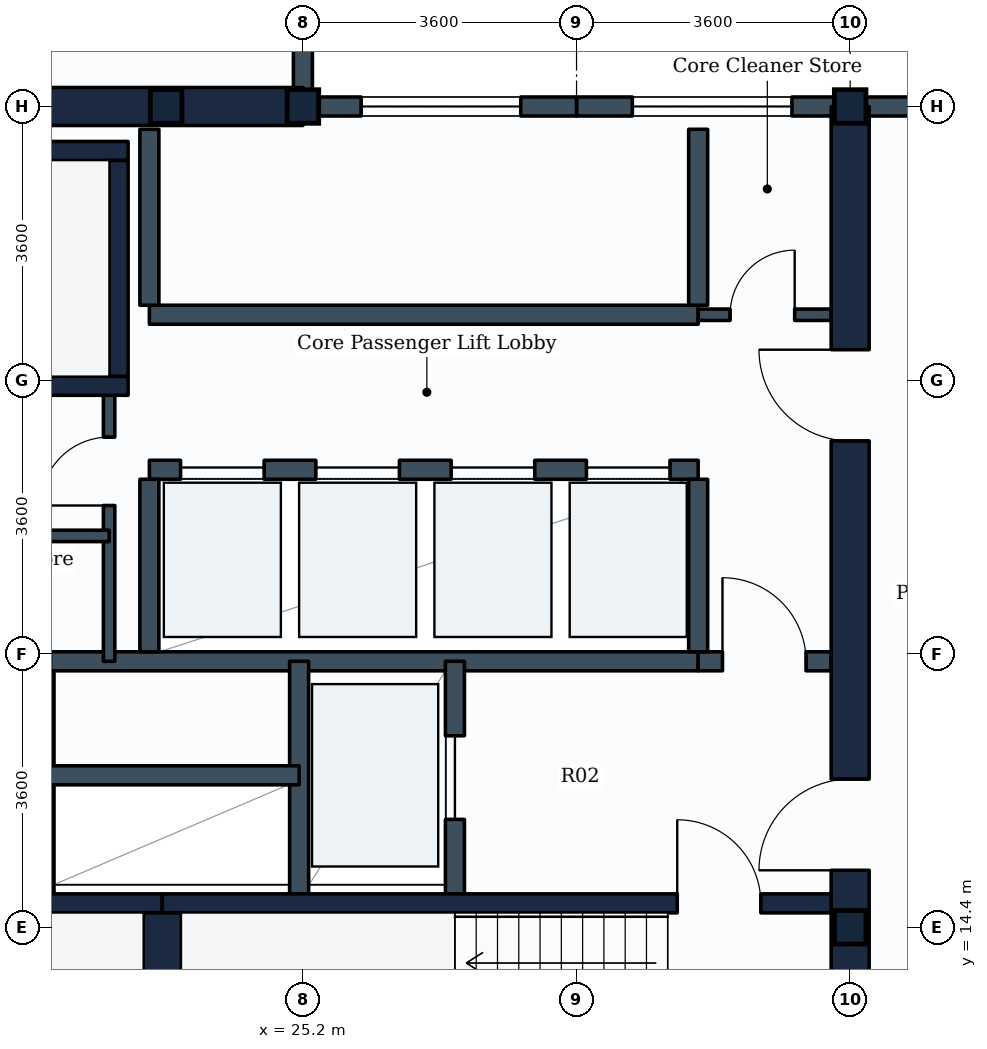
"""IFC4 building model, lengths in metres.
Left out: names, types, materials, properties, quantities, classifications, styles, units other than length and angle.
Written with IfcOpenShell. Run it as: python <this file> out.ifc"""

import sys

from ifc_helpers import new_model, si_unit, direction, frame, frame_2d, origin, origin_2d, place, context, subcontext, project, spatial, rectangle, i_section, extrude, element, fill, save


model = new_model("IFC4")
c1 = context("Model", 3, precision=1e-05, world=origin(), true_north=direction((0.0, 1.0)))
c2 = subcontext(c1, "Body", "Model", "MODEL_VIEW")
j1 = project(units=[si_unit("LENGTHUNIT", "METRE"), si_unit("PLANEANGLEUNIT", "RADIAN")], contexts=[c1])
p1 = place(None, origin())
s1 = spatial("IfcSite", under=j1, at=p1, CompositionType="ELEMENT")
p2 = place(p1, origin())
s2 = spatial("IfcBuilding", under=s1, at=p2, CompositionType="ELEMENT")
p3 = place(p2, frame((0.0, 0.0, 186.2)))
s3 = spatial("IfcBuildingStorey", under=s2, at=p3, CompositionType="ELEMENT", Elevation=186.2)
for number, where, z_axis, x_axis in (
    (1, (23.4, 25.2, 0.0), (0.0, 0.0, 1.0), (1.0, 0.0, 0.0)),
    (2, (25.2, 25.2, 0.0), (0.0, 0.0, 1.0), (1.0, 0.0, 0.0)),
    (3, (32.4, 14.4, 0.0), (0.0, 0.0, 1.0), (1.0, 0.0, 0.0)),
    (4, (32.4, 25.2, 0.0), (0.0, 0.0, 1.0), (1.0, 0.0, 0.0)),
):
    element("IfcColumn", number, at=place(p3, frame(where, z_axis=z_axis, x_axis=x_axis)), inside=s3, PredefinedType="COLUMN", context=c2, shape_type="SweptSolid", body=[
        extrude(i_section(OverallWidth=0.416, OverallDepth=0.442, WebThickness=0.025, FlangeThickness=0.041, FilletRadius=0.015, at=origin_2d()), origin(), (0.0, 0.0, 1.0), 3.8),
    ])
p4 = place(p3, frame((32.4, 25.2, 0.0), z_axis=(0.0, 0.0, 1.0), x_axis=(1.0, 0.0, 0.0)))
e5 = element("IfcWall", 5, at=p4, inside=s3, PredefinedType="STANDARD", context=c2, shape_type="SweptSolid", body=[
    extrude(rectangle(XDim=3.6, YDim=0.25, at=frame_2d((1.8, 0.0))), origin(), (0.0, 0.0, 1.0), 2.93),
])
p5 = place(p3, frame((28.8, 25.2, 0.0), z_axis=(0.0, 0.0, 1.0), x_axis=(1.0, 0.0, 0.0)))
e6 = element("IfcWall", 6, at=p5, inside=s3, PredefinedType="STANDARD", context=c2, shape_type="SweptSolid", body=[
    extrude(rectangle(XDim=3.6, YDim=0.25, at=frame_2d((1.8, 0.0))), origin(), (0.0, 0.0, 1.0), 2.93),
])
p6 = place(p5, frame((0.734, 0.0, 0.85)))
e7 = element("IfcOpeningElement", 7, at=p6, cuts=e6, PredefinedType="OPENING", context=c2, shape_type="SweptSolid", body=[
    extrude(rectangle(XDim=2.1, YDim=1.35, at=frame_2d((1.05, 0.675))), frame((0.0, 0.135, 0.0), z_axis=(0.0, -1.0, 0.0), x_axis=(1.0, 0.0, 0.0)), (0.0, 0.0, 1.0), 0.27),
])
p7 = place(p3, frame((25.2, 25.2, 0.0), z_axis=(0.0, 0.0, 1.0), x_axis=(1.0, 0.0, 0.0)))
e8 = element("IfcWall", 8, at=p7, inside=s3, PredefinedType="STANDARD", context=c2, shape_type="SweptSolid", body=[
    extrude(rectangle(XDim=3.6, YDim=0.25, at=frame_2d((1.8, 0.0))), origin(), (0.0, 0.0, 1.0), 2.93),
])
p8 = place(p7, frame((0.766, 0.0, 0.85)))
e9 = element("IfcOpeningElement", 9, at=p8, cuts=e8, PredefinedType="OPENING", context=c2, shape_type="SweptSolid", body=[
    extrude(rectangle(XDim=2.1, YDim=1.35, at=frame_2d((1.05, 0.675))), frame((0.0, 0.135, 0.0), z_axis=(0.0, -1.0, 0.0), x_axis=(1.0, 0.0, 0.0)), (0.0, 0.0, 1.0), 0.27),
])
p9 = place(p3, frame((25.2, 25.2, 0.0), z_axis=(0.0, 0.0, 1.0), x_axis=(0.0, 1.0, 0.0)))
e10 = element("IfcWall", 10, at=p9, inside=s3, PredefinedType="STANDARD", context=c2, shape_type="SweptSolid", body=[
    extrude(rectangle(XDim=3.6, YDim=0.25, at=frame_2d((1.8, 0.0))), origin(), (0.0, 0.0, 1.0), 2.93),
])
p10 = place(p3, frame((14.4, 25.2, 0.0), z_axis=(0.0, 0.0, 1.0), x_axis=(1.0, 0.0, 0.0)))
e11 = element("IfcWall", 11, at=p10, inside=s3, PredefinedType="SHEAR", context=c2, shape_type="SweptSolid", body=[
    extrude(rectangle(XDim=10.8, YDim=0.5, at=frame_2d((5.4, 0.0))), origin(), (0.0, 0.0, 1.0), 3.55),
])
p11 = place(p3, frame((32.4, 10.8, 0.0), z_axis=(0.0, 0.0, 1.0), x_axis=(0.0, 1.0, 0.0)))
e12 = element("IfcWall", 12, at=p11, inside=s3, PredefinedType="SHEAR", context=c2, shape_type="SweptSolid", body=[
    extrude(rectangle(XDim=14.4, YDim=0.5, at=frame_2d((7.2, 0.0))), origin(), (0.0, 0.0, 1.0), 3.55),
])
p12 = place(p11, frame((4.35, 0.0, 0.0)))
e13 = element("IfcOpeningElement", 13, at=p12, cuts=e12, PredefinedType="OPENING", context=c2, shape_type="SweptSolid", body=[
    extrude(rectangle(XDim=1.2, YDim=2.1, at=frame_2d((0.6, 1.05))), frame((0.0, 0.26, 0.0), z_axis=(0.0, -1.0, 0.0), x_axis=(1.0, 0.0, 0.0)), (0.0, 0.0, 1.0), 0.52),
])
p13 = place(p11, frame((10.0, 0.0, 0.0)))
e14 = element("IfcOpeningElement", 14, at=p13, cuts=e12, PredefinedType="OPENING", context=c2, shape_type="SweptSolid", body=[
    extrude(rectangle(XDim=1.2, YDim=2.1, at=frame_2d((0.6, 1.05))), frame((0.0, 0.26, 0.0), z_axis=(0.0, -1.0, 0.0), x_axis=(1.0, 0.0, 0.0)), (0.0, 0.0, 1.0), 0.52),
])
p14 = place(p3, frame((14.65, 14.715, 0.0), z_axis=(0.0, 0.0, 1.0), x_axis=(1.0, 0.0, 0.0)))
e15 = element("IfcWall", 15, at=p14, inside=s3, PredefinedType="SHEAR", context=c2, shape_type="SweptSolid", body=[
    extrude(rectangle(XDim=8.7, YDim=0.25, at=frame_2d((4.35, 0.0))), origin(), (0.0, 0.0, 1.0), 3.55),
])
p15 = place(p14, frame((0.705, 0.0, 0.0)))
e16 = element("IfcOpeningElement", 16, at=p15, cuts=e15, PredefinedType="OPENING", context=c2, shape_type="SweptSolid", body=[
    extrude(rectangle(XDim=1.1, YDim=2.1, at=frame_2d((0.55, 1.05))), frame((0.0, 0.135, 0.0), z_axis=(0.0, -1.0, 0.0), x_axis=(1.0, 0.0, 0.0)), (0.0, 0.0, 1.0), 0.27),
])
p16 = place(p3, frame((23.35, 14.715, 0.0), z_axis=(0.0, 0.0, 1.0), x_axis=(1.0, 0.0, 0.0)))
e17 = element("IfcWall", 17, at=p16, inside=s3, PredefinedType="SHEAR", context=c2, shape_type="SweptSolid", body=[
    extrude(rectangle(XDim=8.8, YDim=0.25, at=frame_2d((4.4, 0.0))), origin(), (0.0, 0.0, 1.0), 3.55),
])
p17 = place(p16, frame((6.775, 0.0, 0.0)))
e18 = element("IfcOpeningElement", 18, at=p17, cuts=e17, PredefinedType="OPENING", context=c2, shape_type="SweptSolid", body=[
    extrude(rectangle(XDim=1.1, YDim=2.1, at=frame_2d((0.55, 1.05))), frame((0.0, 0.135, 0.0), z_axis=(0.0, -1.0, 0.0), x_axis=(1.0, 0.0, 0.0)), (0.0, 0.0, 1.0), 0.27),
])
p18 = place(p3, frame((23.35, 11.75, 0.0), z_axis=(0.0, 0.0, 1.0), x_axis=(0.0, 1.0, 0.0)))
e19 = element("IfcWall", 19, at=p18, inside=s3, PredefinedType="SHEAR", context=c2, shape_type="SweptSolid", body=[
    extrude(rectangle(XDim=2.84, YDim=0.5, at=frame_2d((1.42, 0.0))), origin(), (0.0, 0.0, 1.0), 3.55),
])
for number, where, z_axis, x_axis in (
    (20, (14.65, 21.525, 0.0), (0.0, 0.0, 1.0), (1.0, 0.0, 0.0)),
    (21, (14.65, 24.615, 0.0), (0.0, 0.0, 1.0), (1.0, 0.0, 0.0)),
):
    element("IfcWall", number, at=place(p3, frame(where, z_axis=z_axis, x_axis=x_axis)), inside=s3, PredefinedType="SHEAR", context=c2, shape_type="SweptSolid", body=[
        extrude(rectangle(XDim=8.25, YDim=0.25, at=frame_2d((4.125, 0.0))), origin(), (0.0, 0.0, 1.0), 3.55),
    ])
p19 = place(p3, frame((22.775, 21.65, 0.0), z_axis=(0.0, 0.0, 1.0), x_axis=(0.0, 1.0, 0.0)))
e22 = element("IfcWall", 22, at=p19, inside=s3, PredefinedType="SHEAR", context=c2, shape_type="SweptSolid", body=[
    extrude(rectangle(XDim=2.84, YDim=0.25, at=frame_2d((1.42, 0.0))), origin(), (0.0, 0.0, 1.0), 3.55),
])
p20 = place(p3, frame((21.8, 14.84, 0.0), z_axis=(0.0, 0.0, 1.0), x_axis=(0.0, 1.0, 0.0)))
e23 = element("IfcWall", 23, at=p20, inside=s3, PredefinedType="PARTITIONING", context=c2, shape_type="SweptSolid", body=[
    extrude(rectangle(XDim=3.06, YDim=0.25, at=frame_2d((1.53, 0.0))), origin(), (0.0, 0.0, 1.0), 3.535),
])
p21 = place(p3, frame((21.88, 17.9, 0.0), z_axis=(0.0, 0.0, 1.0), x_axis=(1.0, 0.0, 0.0)))
e24 = element("IfcWall", 24, at=p21, inside=s3, PredefinedType="PARTITIONING", context=c2, shape_type="SweptSolid", body=[
    extrude(rectangle(XDim=8.52, YDim=0.25, at=frame_2d((4.26, 0.0))), origin(), (0.0, 0.0, 1.0), 3.535),
])
p22 = place(p3, frame((30.4, 17.9, 0.0), z_axis=(0.0, 0.0, 1.0), x_axis=(1.0, 0.0, 0.0)))
e25 = element("IfcWall", 25, at=p22, inside=s3, PredefinedType="PARTITIONING", context=c2, shape_type="SweptSolid", body=[
    extrude(rectangle(XDim=1.75, YDim=0.25, at=frame_2d((0.875, 0.0))), origin(), (0.0, 0.0, 1.0), 3.535),
])
p23 = place(p22, frame((0.32, 0.0, 0.0)))
e26 = element("IfcOpeningElement", 26, at=p23, cuts=e25, PredefinedType="OPENING", context=c2, shape_type="SweptSolid", body=[
    extrude(rectangle(XDim=1.1, YDim=2.1, at=frame_2d((0.55, 1.05))), frame((0.0, 0.135, 0.0), z_axis=(0.0, -1.0, 0.0), x_axis=(1.0, 0.0, 0.0)), (0.0, 0.0, 1.0), 0.27),
])
p24 = place(p3, frame((25.15, 14.84, 0.0), z_axis=(0.0, 0.0, 1.0), x_axis=(0.0, 1.0, 0.0)))
e27 = element("IfcWall", 27, at=p24, inside=s3, PredefinedType="PARTITIONING", context=c2, shape_type="SweptSolid", body=[
    extrude(rectangle(XDim=3.06, YDim=0.25, at=frame_2d((1.53, 0.0))), origin(), (0.0, 0.0, 1.0), 3.535),
])
p25 = place(p3, frame((27.2, 14.84, 0.0), z_axis=(0.0, 0.0, 1.0), x_axis=(0.0, 1.0, 0.0)))
e28 = element("IfcWall", 28, at=p25, inside=s3, PredefinedType="PARTITIONING", context=c2, shape_type="SweptSolid", body=[
    extrude(rectangle(XDim=3.06, YDim=0.25, at=frame_2d((1.53, 0.0))), origin(), (0.0, 0.0, 1.0), 3.535),
])
p26 = place(p25, frame((0.98, 0.0, 0.0)))
e29 = element("IfcOpeningElement", 29, at=p26, cuts=e28, PredefinedType="OPENING", context=c2, shape_type="SweptSolid", body=[
    extrude(rectangle(XDim=1.1, YDim=2.1, at=frame_2d((0.55, 1.05))), frame((0.0, 0.135, 0.0), z_axis=(0.0, -1.0, 0.0), x_axis=(1.0, 0.0, 0.0)), (0.0, 0.0, 1.0), 0.27),
])
p27 = place(p3, frame((21.8, 16.4, 0.0), z_axis=(0.0, 0.0, 1.0), x_axis=(1.0, 0.0, 0.0)))
e30 = element("IfcWall", 30, at=p27, inside=s3, PredefinedType="PARTITIONING", context=c2, shape_type="SweptSolid", body=[
    extrude(rectangle(XDim=3.35, YDim=0.25, at=frame_2d((1.675, 0.0))), origin(), (0.0, 0.0, 1.0), 3.535),
])
p28 = place(p3, frame((23.18, 20.42, 0.0), z_axis=(0.0, 0.0, 1.0), x_axis=(1.0, 0.0, 0.0)))
e31 = element("IfcWall", 31, at=p28, inside=s3, PredefinedType="PARTITIONING", context=c2, shape_type="SweptSolid", body=[
    extrude(rectangle(XDim=7.22, YDim=0.25, at=frame_2d((3.61, 0.0))), origin(), (0.0, 0.0, 1.0), 3.535),
])
p29 = place(p28, frame((0.41, 0.0, 0.0)))
e32 = element("IfcOpeningElement", 32, at=p29, cuts=e31, PredefinedType="OPENING", context=c2, shape_type="SweptSolid", body=[
    extrude(rectangle(XDim=1.1, YDim=2.1, at=frame_2d((0.55, 1.05))), frame((0.0, 0.135, 0.0), z_axis=(0.0, -1.0, 0.0), x_axis=(1.0, 0.0, 0.0)), (0.0, 0.0, 1.0), 0.27),
])
p30 = place(p28, frame((2.19, 0.0, 0.0)))
e33 = element("IfcOpeningElement", 33, at=p30, cuts=e31, PredefinedType="OPENING", context=c2, shape_type="SweptSolid", body=[
    extrude(rectangle(XDim=1.1, YDim=2.1, at=frame_2d((0.55, 1.05))), frame((0.0, 0.135, 0.0), z_axis=(0.0, -1.0, 0.0), x_axis=(1.0, 0.0, 0.0)), (0.0, 0.0, 1.0), 0.27),
])
p31 = place(p28, frame((3.97, 0.0, 0.0)))
e34 = element("IfcOpeningElement", 34, at=p31, cuts=e31, PredefinedType="OPENING", context=c2, shape_type="SweptSolid", body=[
    extrude(rectangle(XDim=1.1, YDim=2.1, at=frame_2d((0.55, 1.05))), frame((0.0, 0.135, 0.0), z_axis=(0.0, -1.0, 0.0), x_axis=(1.0, 0.0, 0.0)), (0.0, 0.0, 1.0), 0.27),
])
p32 = place(p28, frame((5.75, 0.0, 0.0)))
e35 = element("IfcOpeningElement", 35, at=p32, cuts=e31, PredefinedType="OPENING", context=c2, shape_type="SweptSolid", body=[
    extrude(rectangle(XDim=1.1, YDim=2.1, at=frame_2d((0.55, 1.05))), frame((0.0, 0.135, 0.0), z_axis=(0.0, -1.0, 0.0), x_axis=(1.0, 0.0, 0.0)), (0.0, 0.0, 1.0), 0.27),
])
for number, where, z_axis, x_axis in (
    (36, (23.18, 18.025, 0.0), (0.0, 0.0, 1.0), (0.0, 1.0, 0.0)),
    (37, (30.4, 18.025, 0.0), (0.0, 0.0, 1.0), (0.0, 1.0, 0.0)),
):
    element("IfcWall", number, at=place(p3, frame(where, z_axis=z_axis, x_axis=x_axis)), inside=s3, PredefinedType="PARTITIONING", context=c2, shape_type="SweptSolid", body=[
        extrude(rectangle(XDim=2.27, YDim=0.25, at=frame_2d((1.135, 0.0))), origin(), (0.0, 0.0, 1.0), 3.535),
    ])
p33 = place(p3, frame((23.18, 22.46, 0.0), z_axis=(0.0, 0.0, 1.0), x_axis=(1.0, 0.0, 0.0)))
e38 = element("IfcWall", 38, at=p33, inside=s3, PredefinedType="PARTITIONING", context=c2, shape_type="SweptSolid", body=[
    extrude(rectangle(XDim=7.22, YDim=0.25, at=frame_2d((3.61, 0.0))), origin(), (0.0, 0.0, 1.0), 3.535),
])
for number, where, z_axis, x_axis in (
    (39, (23.18, 22.585, 0.0), (0.0, 0.0, 1.0), (0.0, 1.0, 0.0)),
    (40, (30.4, 22.585, 0.0), (0.0, 0.0, 1.0), (0.0, 1.0, 0.0)),
):
    element("IfcWall", number, at=place(p3, frame(where, z_axis=z_axis, x_axis=x_axis)), inside=s3, PredefinedType="PARTITIONING", context=c2, shape_type="SweptSolid", body=[
        extrude(rectangle(XDim=2.315, YDim=0.25, at=frame_2d((1.157, 0.0))), origin(), (0.0, 0.0, 1.0), 3.535),
    ])
p34 = place(p3, frame((22.65, 17.9, 0.0), z_axis=(0.0, 0.0, 1.0), x_axis=(0.0, 1.0, 0.0)))
e41 = element("IfcWall", 41, at=p34, inside=s3, PredefinedType="PARTITIONING", context=c2, shape_type="SweptSolid", body=[
    extrude(rectangle(XDim=3.625, YDim=0.15, at=frame_2d((1.812, 0.0))), origin(), (0.0, 0.0, 1.0), 3.535),
])
p35 = place(p34, frame((2.05, 0.0, 0.0)))
e42 = element("IfcOpeningElement", 42, at=p35, cuts=e41, PredefinedType="OPENING", context=c2, shape_type="SweptSolid", body=[
    extrude(rectangle(XDim=0.9, YDim=2.1, at=frame_2d((0.45, 1.05))), frame((0.0, 0.085, 0.0), z_axis=(0.0, -1.0, 0.0), x_axis=(1.0, 0.0, 0.0)), (0.0, 0.0, 1.0), 0.17),
])
p36 = place(p3, frame((14.65, 19.55, 0.0), z_axis=(0.0, 0.0, 1.0), x_axis=(1.0, 0.0, 0.0)))
e43 = element("IfcWall", 43, at=p36, inside=s3, PredefinedType="PARTITIONING", context=c2, shape_type="SweptSolid", body=[
    extrude(rectangle(XDim=8.0, YDim=0.15, at=frame_2d((4.0, 0.0))), origin(), (0.0, 0.0, 1.0), 3.535),
])
p37 = place(p3, frame((30.4, 22.46, 0.0), z_axis=(0.0, 0.0, 1.0), x_axis=(1.0, 0.0, 0.0)))
e44 = element("IfcWall", 44, at=p37, inside=s3, PredefinedType="PARTITIONING", context=c2, shape_type="SweptSolid", body=[
    extrude(rectangle(XDim=1.75, YDim=0.15, at=frame_2d((0.875, 0.0))), origin(), (0.0, 0.0, 1.0), 3.535),
])
p38 = place(p37, frame((0.42, 0.0, 0.0)))
e45 = element("IfcOpeningElement", 45, at=p38, cuts=e44, PredefinedType="OPENING", context=c2, shape_type="SweptSolid", body=[
    extrude(rectangle(XDim=0.85, YDim=2.1, at=frame_2d((0.425, 1.05))), frame((0.0, 0.085, 0.0), z_axis=(0.0, -1.0, 0.0), x_axis=(1.0, 0.0, 0.0)), (0.0, 0.0, 1.0), 0.17),
])
p39 = place(p6, origin())
e46 = element("IfcWindow", 46, at=p39, inside=s3, PartitioningType="SINGLE_PANEL", PredefinedType="WINDOW", context=c2, shape_type="SweptSolid", body=[
    extrude(rectangle(XDim=2.1, YDim=1.35, at=frame_2d((1.05, 0.675))), frame((0.0, 0.03, 0.0), z_axis=(0.0, -1.0, 0.0), x_axis=(1.0, 0.0, 0.0)), (0.0, 0.0, 1.0), 0.06),
])
fill(e7, e46)
p40 = place(p8, origin())
e47 = element("IfcWindow", 47, at=p40, inside=s3, PartitioningType="SINGLE_PANEL", PredefinedType="WINDOW", context=c2, shape_type="SweptSolid", body=[
    extrude(rectangle(XDim=2.1, YDim=1.35, at=frame_2d((1.05, 0.675))), frame((0.0, 0.03, 0.0), z_axis=(0.0, -1.0, 0.0), x_axis=(1.0, 0.0, 0.0)), (0.0, 0.0, 1.0), 0.06),
])
fill(e9, e47)
p41 = place(p17, origin())
e48 = element("IfcDoor", 48, at=p41, inside=s3, OperationType="SINGLE_SWING_LEFT", PredefinedType="DOOR", context=c2, shape_type="SweptSolid", body=[
    extrude(rectangle(XDim=1.1, YDim=2.1, at=frame_2d((0.55, 1.05))), frame((0.0, 0.025, 0.0), z_axis=(0.0, -1.0, 0.0), x_axis=(1.0, 0.0, 0.0)), (0.0, 0.0, 1.0), 0.05),
])
fill(e18, e48)
p42 = place(p26, origin())
e49 = element("IfcDoor", 49, at=p42, inside=s3, OperationType="SLIDING_TO_LEFT", PredefinedType="DOOR", context=c2, shape_type="SweptSolid", body=[
    extrude(rectangle(XDim=1.1, YDim=2.1, at=frame_2d((0.55, 1.05))), frame((0.0, 0.025, 0.0), z_axis=(0.0, -1.0, 0.0), x_axis=(1.0, 0.0, 0.0)), (0.0, 0.0, 1.0), 0.05),
])
fill(e29, e49)
p43 = place(p12, origin())
e50 = element("IfcDoor", 50, at=p43, inside=s3, OperationType="SINGLE_SWING_LEFT", PredefinedType="DOOR", context=c2, shape_type="SweptSolid", body=[
    extrude(rectangle(XDim=1.2, YDim=2.1, at=frame_2d((0.6, 1.05))), frame((0.0, 0.025, 0.0), z_axis=(0.0, -1.0, 0.0), x_axis=(1.0, 0.0, 0.0)), (0.0, 0.0, 1.0), 0.05),
])
fill(e13, e50)
p44 = place(p23, origin())
e51 = element("IfcDoor", 51, at=p44, inside=s3, OperationType="SINGLE_SWING_LEFT", PredefinedType="DOOR", context=c2, shape_type="SweptSolid", body=[
    extrude(rectangle(XDim=1.1, YDim=2.1, at=frame_2d((0.55, 1.05))), frame((0.0, 0.025, 0.0), z_axis=(0.0, -1.0, 0.0), x_axis=(1.0, 0.0, 0.0)), (0.0, 0.0, 1.0), 0.05),
])
fill(e26, e51)
p45 = place(p29, origin())
e52 = element("IfcDoor", 52, at=p45, inside=s3, OperationType="SLIDING_TO_LEFT", PredefinedType="DOOR", context=c2, shape_type="SweptSolid", body=[
    extrude(rectangle(XDim=1.1, YDim=2.1, at=frame_2d((0.55, 1.05))), frame((0.0, 0.025, 0.0), z_axis=(0.0, -1.0, 0.0), x_axis=(1.0, 0.0, 0.0)), (0.0, 0.0, 1.0), 0.05),
])
fill(e32, e52)
p46 = place(p30, origin())
e53 = element("IfcDoor", 53, at=p46, inside=s3, OperationType="SLIDING_TO_LEFT", PredefinedType="DOOR", context=c2, shape_type="SweptSolid", body=[
    extrude(rectangle(XDim=1.1, YDim=2.1, at=frame_2d((0.55, 1.05))), frame((0.0, 0.025, 0.0), z_axis=(0.0, -1.0, 0.0), x_axis=(1.0, 0.0, 0.0)), (0.0, 0.0, 1.0), 0.05),
])
fill(e33, e53)
p47 = place(p31, origin())
e54 = element("IfcDoor", 54, at=p47, inside=s3, OperationType="SLIDING_TO_LEFT", PredefinedType="DOOR", context=c2, shape_type="SweptSolid", body=[
    extrude(rectangle(XDim=1.1, YDim=2.1, at=frame_2d((0.55, 1.05))), frame((0.0, 0.025, 0.0), z_axis=(0.0, -1.0, 0.0), x_axis=(1.0, 0.0, 0.0)), (0.0, 0.0, 1.0), 0.05),
])
fill(e34, e54)
p48 = place(p32, origin())
e55 = element("IfcDoor", 55, at=p48, inside=s3, OperationType="SLIDING_TO_LEFT", PredefinedType="DOOR", context=c2, shape_type="SweptSolid", body=[
    extrude(rectangle(XDim=1.1, YDim=2.1, at=frame_2d((0.55, 1.05))), frame((0.0, 0.025, 0.0), z_axis=(0.0, -1.0, 0.0), x_axis=(1.0, 0.0, 0.0)), (0.0, 0.0, 1.0), 0.05),
])
fill(e35, e55)
p49 = place(p13, origin())
e56 = element("IfcDoor", 56, at=p49, inside=s3, OperationType="SINGLE_SWING_RIGHT", PredefinedType="DOOR", context=c2, shape_type="SweptSolid", body=[
    extrude(rectangle(XDim=1.2, YDim=2.1, at=frame_2d((0.6, 1.05))), frame((0.0, 0.025, 0.0), z_axis=(0.0, -1.0, 0.0), x_axis=(1.0, 0.0, 0.0)), (0.0, 0.0, 1.0), 0.05),
])
fill(e14, e56)
p50 = place(p35, origin())
e57 = element("IfcDoor", 57, at=p50, inside=s3, OperationType="SINGLE_SWING_LEFT", PredefinedType="DOOR", context=c2, shape_type="SweptSolid", body=[
    extrude(rectangle(XDim=0.9, YDim=2.1, at=frame_2d((0.45, 1.05))), frame((0.0, 0.025, 0.0), z_axis=(0.0, -1.0, 0.0), x_axis=(1.0, 0.0, 0.0)), (0.0, 0.0, 1.0), 0.05),
])
fill(e42, e57)
p51 = place(p38, origin())
e58 = element("IfcDoor", 58, at=p51, inside=s3, OperationType="SINGLE_SWING_RIGHT", PredefinedType="DOOR", context=c2, shape_type="SweptSolid", body=[
    extrude(rectangle(XDim=0.85, YDim=2.1, at=frame_2d((0.425, 1.05))), frame((0.0, 0.025, 0.0), z_axis=(0.0, -1.0, 0.0), x_axis=(1.0, 0.0, 0.0)), (0.0, 0.0, 1.0), 0.05),
])
fill(e45, e58)
save(model, sys.argv[1])
